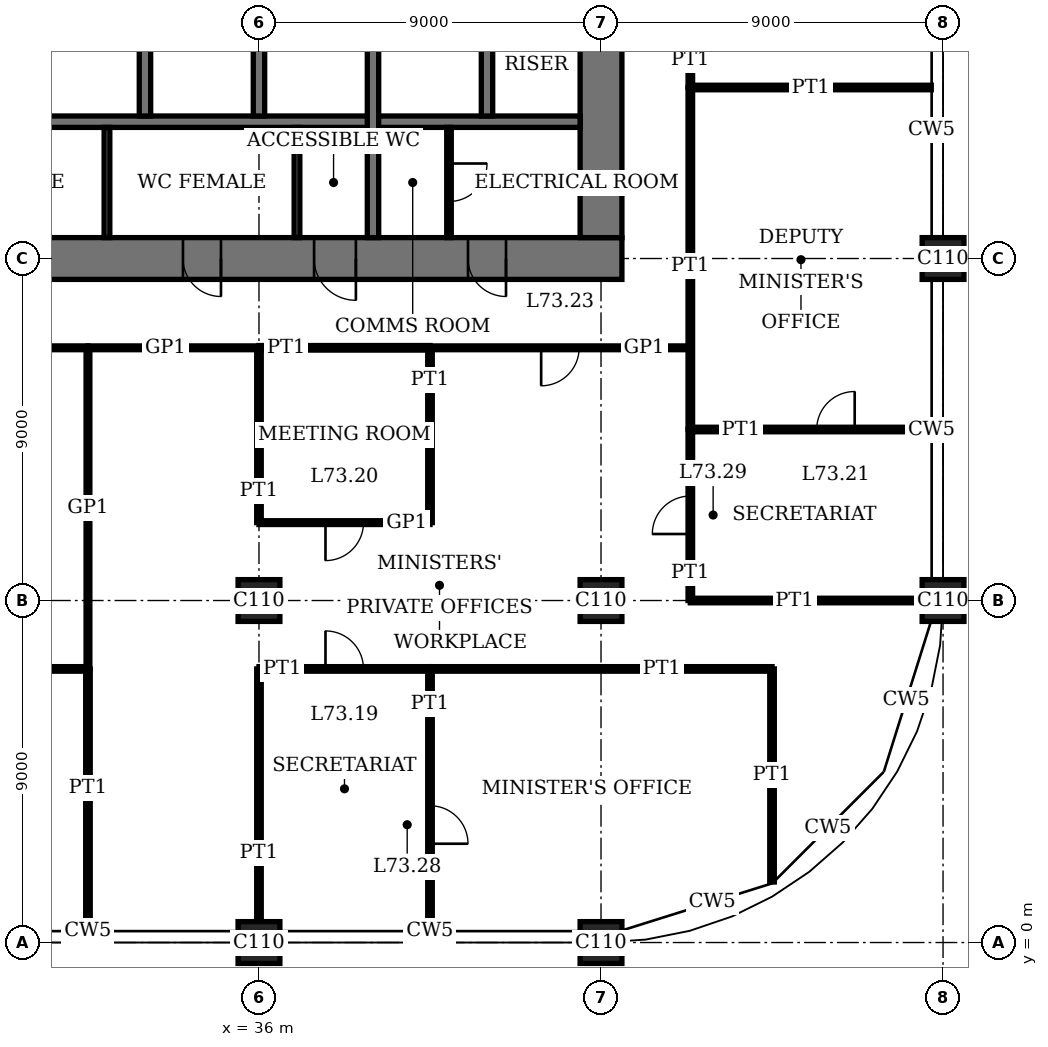
"""IFC4 building model, lengths in metres.
Left out: names, types, materials, properties, quantities, classifications, styles, units other than length and angle.
Written with IfcOpenShell. Run it as: python <this file> out.ifc"""

import sys

from ifc_helpers import new_model, si_unit, direction, frame, frame_2d, origin, origin_2d, place, context, subcontext, project, spatial, rectangle, extrude, element, fill, save


model = new_model("IFC4")
c1 = context("Model", 3, precision=1e-05, world=origin(), true_north=direction((0.0, 1.0)))
c2 = subcontext(c1, "Body", "Model", "MODEL_VIEW")
j1 = project(units=[si_unit("LENGTHUNIT", "METRE"), si_unit("PLANEANGLEUNIT", "RADIAN")], contexts=[c1])
p1 = place(None, origin())
s1 = spatial("IfcSite", under=j1, at=p1, CompositionType="ELEMENT")
p2 = place(p1, origin())
s2 = spatial("IfcBuilding", under=s1, at=p2, CompositionType="ELEMENT")
p3 = place(p2, frame((0.0, 0.0, 299.4)))
s3 = spatial("IfcBuildingStorey", under=s2, at=p3, CompositionType="ELEMENT", Elevation=299.4)
for number, where, z_axis, x_axis in (
    (1, (36.0, 0.0, 0.0), (0.0, 0.0, 1.0), (1.0, 0.0, 0.0)),
    (2, (36.0, 9.0, 0.0), (0.0, 0.0, 1.0), (1.0, 0.0, 0.0)),
    (3, (45.0, 0.0, 0.0), (0.0, 0.0, 1.0), (1.0, 0.0, 0.0)),
    (4, (45.0, 9.0, 0.0), (0.0, 0.0, 1.0), (1.0, 0.0, 0.0)),
    (5, (54.0, 9.0, 0.0), (0.0, 0.0, 1.0), (1.0, 0.0, 0.0)),
    (6, (54.0, 18.0, 0.0), (0.0, 0.0, 1.0), (1.0, 0.0, 0.0)),
):
    element("IfcColumn", number, at=place(p3, frame(where, z_axis=z_axis, x_axis=x_axis)), inside=s3, PredefinedType="COLUMN", context=c2, shape_type="SweptSolid", body=[
        extrude(rectangle(XDim=1.1, YDim=1.1, at=origin_2d()), origin(), (0.0, 0.0, 1.0), 4.0),
    ])
p4 = place(p3, frame((17.45, 18.0, 0.0), z_axis=(0.0, 0.0, 1.0), x_axis=(1.0, 0.0, 0.0)))
e7 = element("IfcWall", 7, at=p4, inside=s3, PredefinedType="SHEAR", context=c2, shape_type="SweptSolid", body=[
    extrude(rectangle(XDim=28.1, YDim=1.1, at=frame_2d((14.05, 0.0))), origin(), (0.0, 0.0, 1.0), 4.0),
])
p5 = place(p4, frame((11.55, 0.0, 0.0)))
e8 = element("IfcOpeningElement", 8, at=p5, cuts=e7, PredefinedType="OPENING", context=c2, shape_type="SweptSolid", body=[
    extrude(rectangle(XDim=1.0, YDim=2.4, at=frame_2d((0.5, 1.2))), frame((0.0, 0.56, 0.0), z_axis=(0.0, -1.0, 0.0), x_axis=(1.0, 0.0, 0.0)), (0.0, 0.0, 1.0), 1.12),
])
p6 = place(p4, frame((16.55, 0.0, 0.0)))
e9 = element("IfcOpeningElement", 9, at=p6, cuts=e7, PredefinedType="OPENING", context=c2, shape_type="SweptSolid", body=[
    extrude(rectangle(XDim=1.0, YDim=2.4, at=frame_2d((0.5, 1.2))), frame((0.0, 0.56, 0.0), z_axis=(0.0, -1.0, 0.0), x_axis=(1.0, 0.0, 0.0)), (0.0, 0.0, 1.0), 1.12),
])
p7 = place(p4, frame((20.0, 0.0, 0.0)))
e10 = element("IfcOpeningElement", 10, at=p7, cuts=e7, PredefinedType="OPENING", context=c2, shape_type="SweptSolid", body=[
    extrude(rectangle(XDim=1.1, YDim=2.4, at=frame_2d((0.55, 1.2))), frame((0.0, 0.56, 0.0), z_axis=(0.0, -1.0, 0.0), x_axis=(1.0, 0.0, 0.0)), (0.0, 0.0, 1.0), 1.12),
])
p8 = place(p4, frame((24.05, 0.0, 0.0)))
e11 = element("IfcOpeningElement", 11, at=p8, cuts=e7, PredefinedType="OPENING", context=c2, shape_type="SweptSolid", body=[
    extrude(rectangle(XDim=1.0, YDim=2.4, at=frame_2d((0.5, 1.2))), frame((0.0, 0.56, 0.0), z_axis=(0.0, -1.0, 0.0), x_axis=(1.0, 0.0, 0.0)), (0.0, 0.0, 1.0), 1.12),
])
p9 = place(p3, frame((45.0, 18.55, 0.0), z_axis=(0.0, 0.0, 1.0), x_axis=(0.0, 1.0, 0.0)))
e12 = element("IfcWall", 12, at=p9, inside=s3, PredefinedType="SHEAR", context=c2, shape_type="SweptSolid", body=[
    extrude(rectangle(XDim=16.9, YDim=1.1, at=frame_2d((8.45, 0.0))), origin(), (0.0, 0.0, 1.0), 4.0),
])
p10 = place(p9, frame((8.45, 0.0, 0.0)))
e13 = element("IfcOpeningElement", 13, at=p10, cuts=e12, PredefinedType="OPENING", context=c2, shape_type="SweptSolid", body=[
    extrude(rectangle(XDim=1.8, YDim=2.4, at=frame_2d((0.9, 1.2))), frame((0.0, 0.56, 0.0), z_axis=(0.0, -1.0, 0.0), x_axis=(1.0, 0.0, 0.0)), (0.0, 0.0, 1.0), 1.12),
])
p11 = place(p3, frame((27.15, 21.6, 0.0), z_axis=(0.0, 0.0, 1.0), x_axis=(1.0, 0.0, 0.0)))
e14 = element("IfcWall", 14, at=p11, inside=s3, PredefinedType="SHEAR", context=c2, shape_type="SweptSolid", body=[
    extrude(rectangle(XDim=17.3, YDim=0.3, at=frame_2d((8.65, 0.0))), origin(), (0.0, 0.0, 1.0), 4.0),
])
for number, where, z_axis, x_axis in (
    (15, (33.0, 21.75, 0.0), (0.0, 0.0, 1.0), (0.0, 1.0, 0.0)),
    (16, (36.0, 21.75, 0.0), (0.0, 0.0, 1.0), (0.0, 1.0, 0.0)),
):
    element("IfcWall", number, at=place(p3, frame(where, z_axis=z_axis, x_axis=x_axis)), inside=s3, PredefinedType="SHEAR", context=c2, shape_type="SweptSolid", body=[
        extrude(rectangle(XDim=2.7, YDim=0.3, at=frame_2d((1.35, 0.0))), origin(), (0.0, 0.0, 1.0), 4.0),
    ])
p12 = place(p3, frame((39.0, 18.55, 0.0), z_axis=(0.0, 0.0, 1.0), x_axis=(0.0, 1.0, 0.0)))
e17 = element("IfcWall", 17, at=p12, inside=s3, PredefinedType="SHEAR", context=c2, shape_type="SweptSolid", body=[
    extrude(rectangle(XDim=5.9, YDim=0.3, at=frame_2d((2.95, 0.0))), origin(), (0.0, 0.0, 1.0), 4.0),
])
p13 = place(p3, frame((42.0, 21.75, 0.0), z_axis=(0.0, 0.0, 1.0), x_axis=(0.0, 1.0, 0.0)))
e18 = element("IfcWall", 18, at=p13, inside=s3, PredefinedType="SHEAR", context=c2, shape_type="SweptSolid", body=[
    extrude(rectangle(XDim=2.7, YDim=0.3, at=frame_2d((1.35, 0.0))), origin(), (0.0, 0.0, 1.0), 4.0),
])
p14 = place(p3, frame((22.5, 7.2, 0.0), z_axis=(0.0, 0.0, 1.0), x_axis=(1.0, 0.0, 0.0)))
e19 = element("IfcWall", 19, at=p14, inside=s3, PredefinedType="PARTITIONING", context=c2, shape_type="SweptSolid", body=[
    extrude(rectangle(XDim=9.0, YDim=0.12, at=frame_2d((4.5, 0.0))), origin(), (0.0, 0.0, 1.0), 3.75),
])
p15 = place(p3, frame((36.0, 7.2, 0.0), z_axis=(0.0, 0.0, 1.0), x_axis=(1.0, 0.0, 0.0)))
e20 = element("IfcWall", 20, at=p15, inside=s3, PredefinedType="PARTITIONING", context=c2, shape_type="SweptSolid", body=[
    extrude(rectangle(XDim=4.5, YDim=0.12, at=frame_2d((2.25, 0.0))), origin(), (0.0, 0.0, 1.0), 3.75),
])
p16 = place(p15, frame((1.75, 0.0, 0.0)))
e21 = element("IfcOpeningElement", 21, at=p16, cuts=e20, PredefinedType="OPENING", context=c2, shape_type="SweptSolid", body=[
    extrude(rectangle(XDim=1.0, YDim=2.4, at=frame_2d((0.5, 1.2))), frame((0.0, 0.07, 0.0), z_axis=(0.0, -1.0, 0.0), x_axis=(1.0, 0.0, 0.0)), (0.0, 0.0, 1.0), 0.14),
])
p17 = place(p3, frame((40.5, 7.2, 0.0), z_axis=(0.0, 0.0, 1.0), x_axis=(1.0, 0.0, 0.0)))
e22 = element("IfcWall", 22, at=p17, inside=s3, PredefinedType="PARTITIONING", context=c2, shape_type="SweptSolid", body=[
    extrude(rectangle(XDim=9.0, YDim=0.12, at=frame_2d((4.5, 0.0))), origin(), (0.0, 0.0, 1.0), 3.75),
])
p18 = place(p3, frame((47.35, 9.0, 0.0), z_axis=(0.0, 0.0, 1.0), x_axis=(1.0, 0.0, 0.0)))
e23 = element("IfcWall", 23, at=p18, inside=s3, PredefinedType="PARTITIONING", context=c2, shape_type="SweptSolid", body=[
    extrude(rectangle(XDim=6.1, YDim=0.12, at=frame_2d((3.05, 0.0))), origin(), (0.0, 0.0, 1.0), 3.05),
])
p19 = place(p3, frame((36.0, 11.05, 0.0), z_axis=(0.0, 0.0, 1.0), x_axis=(1.0, 0.0, 0.0)))
e24 = element("IfcWall", 24, at=p19, inside=s3, PredefinedType="PARTITIONING", context=c2, shape_type="SweptSolid", body=[
    extrude(rectangle(XDim=4.5, YDim=0.1, at=frame_2d((2.25, 0.0))), origin(), (0.0, 0.0, 1.0), 3.75),
])
p20 = place(p19, frame((1.75, 0.0, 0.0)))
e25 = element("IfcOpeningElement", 25, at=p20, cuts=e24, PredefinedType="OPENING", context=c2, shape_type="SweptSolid", body=[
    extrude(rectangle(XDim=1.0, YDim=2.4, at=frame_2d((0.5, 1.2))), frame((0.0, 0.06, 0.0), z_axis=(0.0, -1.0, 0.0), x_axis=(1.0, 0.0, 0.0)), (0.0, 0.0, 1.0), 0.12),
])
p21 = place(p3, frame((47.35, 13.5, 0.0), z_axis=(0.0, 0.0, 1.0), x_axis=(1.0, 0.0, 0.0)))
e26 = element("IfcWall", 26, at=p21, inside=s3, PredefinedType="PARTITIONING", context=c2, shape_type="SweptSolid", body=[
    extrude(rectangle(XDim=6.34, YDim=0.12, at=frame_2d((3.17, 0.0))), origin(), (0.0, 0.0, 1.0), 3.1),
])
p22 = place(p21, frame((3.325, 0.0, 0.0)))
e27 = element("IfcOpeningElement", 27, at=p22, cuts=e26, PredefinedType="OPENING", context=c2, shape_type="SweptSolid", body=[
    extrude(rectangle(XDim=1.0, YDim=2.4, at=frame_2d((0.5, 1.2))), frame((0.0, 0.07, 0.0), z_axis=(0.0, -1.0, 0.0), x_axis=(1.0, 0.0, 0.0)), (0.0, 0.0, 1.0), 0.14),
])
p23 = place(p3, frame((36.0, 15.65, 0.0), z_axis=(0.0, 0.0, 1.0), x_axis=(1.0, 0.0, 0.0)))
e28 = element("IfcWall", 28, at=p23, inside=s3, PredefinedType="PARTITIONING", context=c2, shape_type="SweptSolid", body=[
    extrude(rectangle(XDim=4.5, YDim=0.12, at=frame_2d((2.25, 0.0))), origin(), (0.0, 0.0, 1.0), 3.75),
])
p24 = place(p3, frame((15.6, 15.65, 0.0), z_axis=(0.0, 0.0, 1.0), x_axis=(1.0, 0.0, 0.0)))
e29 = element("IfcWall", 29, at=p24, inside=s3, PredefinedType="PARTITIONING", context=c2, shape_type="SweptSolid", body=[
    extrude(rectangle(XDim=15.9, YDim=0.1, at=frame_2d((7.95, 0.0))), origin(), (0.0, 0.0, 1.0), 3.75),
])
p25 = place(p24, frame((7.45, 0.0, 0.0)))
e30 = element("IfcOpeningElement", 30, at=p25, cuts=e29, PredefinedType="OPENING", context=c2, shape_type="SweptSolid", body=[
    extrude(rectangle(XDim=1.0, YDim=2.4, at=frame_2d((0.5, 1.2))), frame((0.0, 0.06, 0.0), z_axis=(0.0, -1.0, 0.0), x_axis=(1.0, 0.0, 0.0)), (0.0, 0.0, 1.0), 0.12),
])
p26 = place(p3, frame((40.51, 15.65, 0.0), z_axis=(0.0, 0.0, 1.0), x_axis=(1.0, 0.0, 0.0)))
e31 = element("IfcWall", 31, at=p26, inside=s3, PredefinedType="PARTITIONING", context=c2, shape_type="SweptSolid", body=[
    extrude(rectangle(XDim=6.83, YDim=0.1, at=frame_2d((3.415, 0.0))), origin(), (0.0, 0.0, 1.0), 3.75),
])
p27 = place(p26, frame((2.915, 0.0, 0.0)))
e32 = element("IfcOpeningElement", 32, at=p27, cuts=e31, PredefinedType="OPENING", context=c2, shape_type="SweptSolid", body=[
    extrude(rectangle(XDim=1.0, YDim=2.4, at=frame_2d((0.5, 1.2))), frame((0.0, 0.06, 0.0), z_axis=(0.0, -1.0, 0.0), x_axis=(1.0, 0.0, 0.0)), (0.0, 0.0, 1.0), 0.12),
])
p28 = place(p3, frame((31.5, 15.65, 0.0), z_axis=(0.0, 0.0, 1.0), x_axis=(1.0, 0.0, 0.0)))
e33 = element("IfcWall", 33, at=p28, inside=s3, PredefinedType="PARTITIONING", context=c2, shape_type="SweptSolid", body=[
    extrude(rectangle(XDim=4.49, YDim=0.1, at=frame_2d((2.245, 0.0))), origin(), (0.0, 0.0, 1.0), 3.75),
])
p29 = place(p3, frame((47.35, 22.5, 0.0), z_axis=(0.0, 0.0, 1.0), x_axis=(1.0, 0.0, 0.0)))
e34 = element("IfcWall", 34, at=p29, inside=s3, PredefinedType="PARTITIONING", context=c2, shape_type="SweptSolid", body=[
    extrude(rectangle(XDim=6.34, YDim=0.12, at=frame_2d((3.17, 0.0))), origin(), (0.0, 0.0, 1.0), 3.1),
])
p30 = place(p3, frame((31.5, 0.31, 0.0), z_axis=(0.0, 0.0, 1.0), x_axis=(0.0, 1.0, 0.0)))
e35 = element("IfcWall", 35, at=p30, inside=s3, PredefinedType="PARTITIONING", context=c2, shape_type="SweptSolid", body=[
    extrude(rectangle(XDim=6.89, YDim=0.12, at=frame_2d((3.445, 0.0))), origin(), (0.0, 0.0, 1.0), 3.75),
])
p31 = place(p3, frame((31.5, 7.2, 0.0), z_axis=(0.0, 0.0, 1.0), x_axis=(0.0, 1.0, 0.0)))
e36 = element("IfcWall", 36, at=p31, inside=s3, PredefinedType="PARTITIONING", context=c2, shape_type="SweptSolid", body=[
    extrude(rectangle(XDim=8.45, YDim=0.1, at=frame_2d((4.225, 0.0))), origin(), (0.0, 0.0, 1.0), 3.75),
])
p32 = place(p3, frame((36.0, 0.55, 0.0), z_axis=(0.0, 0.0, 1.0), x_axis=(0.0, 1.0, 0.0)))
e37 = element("IfcWall", 37, at=p32, inside=s3, PredefinedType="PARTITIONING", context=c2, shape_type="SweptSolid", body=[
    extrude(rectangle(XDim=6.65, YDim=0.12, at=frame_2d((3.325, 0.0))), origin(), (0.0, 0.0, 1.0), 3.05),
])
p33 = place(p3, frame((36.0, 11.05, 0.0), z_axis=(0.0, 0.0, 1.0), x_axis=(0.0, 1.0, 0.0)))
e38 = element("IfcWall", 38, at=p33, inside=s3, PredefinedType="PARTITIONING", context=c2, shape_type="SweptSolid", body=[
    extrude(rectangle(XDim=4.6, YDim=0.12, at=frame_2d((2.3, 0.0))), origin(), (0.0, 0.0, 1.0), 3.05),
])
p34 = place(p3, frame((40.5, 0.31, 0.0), z_axis=(0.0, 0.0, 1.0), x_axis=(0.0, 1.0, 0.0)))
e39 = element("IfcWall", 39, at=p34, inside=s3, PredefinedType="PARTITIONING", context=c2, shape_type="SweptSolid", body=[
    extrude(rectangle(XDim=6.89, YDim=0.12, at=frame_2d((3.445, 0.0))), origin(), (0.0, 0.0, 1.0), 3.75),
])
p35 = place(p34, frame((2.29, 0.0, 0.0)))
e40 = element("IfcOpeningElement", 40, at=p35, cuts=e39, PredefinedType="OPENING", context=c2, shape_type="SweptSolid", body=[
    extrude(rectangle(XDim=1.0, YDim=2.4, at=frame_2d((0.5, 1.2))), frame((0.0, 0.07, 0.0), z_axis=(0.0, -1.0, 0.0), x_axis=(1.0, 0.0, 0.0)), (0.0, 0.0, 1.0), 0.14),
])
p36 = place(p3, frame((40.5, 11.05, 0.0), z_axis=(0.0, 0.0, 1.0), x_axis=(0.0, 1.0, 0.0)))
e41 = element("IfcWall", 41, at=p36, inside=s3, PredefinedType="PARTITIONING", context=c2, shape_type="SweptSolid", body=[
    extrude(rectangle(XDim=4.6, YDim=0.12, at=frame_2d((2.3, 0.0))), origin(), (0.0, 0.0, 1.0), 3.75),
])
p37 = place(p3, frame((47.35, 9.0, 0.0), z_axis=(0.0, 0.0, 1.0), x_axis=(0.0, 1.0, 0.0)))
e42 = element("IfcWall", 42, at=p37, inside=s3, PredefinedType="PARTITIONING", context=c2, shape_type="SweptSolid", body=[
    extrude(rectangle(XDim=4.5, YDim=0.12, at=frame_2d((2.25, 0.0))), origin(), (0.0, 0.0, 1.0), 3.75),
])
p38 = place(p37, frame((1.75, 0.0, 0.0)))
e43 = element("IfcOpeningElement", 43, at=p38, cuts=e42, PredefinedType="OPENING", context=c2, shape_type="SweptSolid", body=[
    extrude(rectangle(XDim=1.0, YDim=2.4, at=frame_2d((0.5, 1.2))), frame((0.0, 0.07, 0.0), z_axis=(0.0, -1.0, 0.0), x_axis=(1.0, 0.0, 0.0)), (0.0, 0.0, 1.0), 0.14),
])
p39 = place(p3, frame((47.35, 13.5, 0.0), z_axis=(0.0, 0.0, 1.0), x_axis=(0.0, 1.0, 0.0)))
e44 = element("IfcWall", 44, at=p39, inside=s3, PredefinedType="PARTITIONING", context=c2, shape_type="SweptSolid", body=[
    extrude(rectangle(XDim=9.0, YDim=0.12, at=frame_2d((4.5, 0.0))), origin(), (0.0, 0.0, 1.0), 3.75),
])
p40 = place(p3, frame((47.35, 22.5, 0.0), z_axis=(0.0, 0.0, 1.0), x_axis=(0.0, 1.0, 0.0)))
e45 = element("IfcWall", 45, at=p40, inside=s3, PredefinedType="PARTITIONING", context=c2, shape_type="SweptSolid", body=[
    extrude(rectangle(XDim=4.5, YDim=0.12, at=frame_2d((2.25, 0.0))), origin(), (0.0, 0.0, 1.0), 3.75),
])
p41 = place(p40, frame((1.75, 0.0, 0.0)))
e46 = element("IfcOpeningElement", 46, at=p41, cuts=e45, PredefinedType="OPENING", context=c2, shape_type="SweptSolid", body=[
    extrude(rectangle(XDim=1.0, YDim=2.4, at=frame_2d((0.5, 1.2))), frame((0.0, 0.07, 0.0), z_axis=(0.0, -1.0, 0.0), x_axis=(1.0, 0.0, 0.0)), (0.0, 0.0, 1.0), 0.14),
])
p42 = place(p3, frame((49.5, 1.592, 0.0), z_axis=(0.0, 0.0, 1.0), x_axis=(0.0, 1.0, 0.0)))
e47 = element("IfcWall", 47, at=p42, inside=s3, PredefinedType="PARTITIONING", context=c2, shape_type="SweptSolid", body=[
    extrude(rectangle(XDim=5.608, YDim=0.12, at=frame_2d((2.804, 0.0))), origin(), (0.0, 0.0, 1.0), 3.75),
])
for number, where, z_axis, x_axis in (
    (48, (32.0, 18.55, 0.0), (0.0, 0.0, 1.0), (0.0, 1.0, 0.0)),
    (49, (37.0, 18.55, 0.0), (0.0, 0.0, 1.0), (0.0, 1.0, 0.0)),
):
    element("IfcWall", number, at=place(p3, frame(where, z_axis=z_axis, x_axis=x_axis)), inside=s3, PredefinedType="PARTITIONING", context=c2, shape_type="SweptSolid", body=[
        extrude(rectangle(XDim=2.9, YDim=0.15, at=frame_2d((1.45, 0.0))), origin(), (0.0, 0.0, 1.0), 3.75),
    ])
p43 = place(p3, frame((41.0, 18.55, 0.0), z_axis=(0.0, 0.0, 1.0), x_axis=(0.0, 1.0, 0.0)))
e50 = element("IfcWall", 50, at=p43, inside=s3, PredefinedType="PARTITIONING", context=c2, shape_type="SweptSolid", body=[
    extrude(rectangle(XDim=2.9, YDim=0.12, at=frame_2d((1.45, 0.0))), origin(), (0.0, 0.0, 1.0), 3.75),
])
p44 = place(p43, frame((0.95, 0.0, 0.0)))
e51 = element("IfcOpeningElement", 51, at=p44, cuts=e50, PredefinedType="OPENING", context=c2, shape_type="SweptSolid", body=[
    extrude(rectangle(XDim=1.0, YDim=2.4, at=frame_2d((0.5, 1.2))), frame((0.0, 0.07, 0.0), z_axis=(0.0, -1.0, 0.0), x_axis=(1.0, 0.0, 0.0)), (0.0, 0.0, 1.0), 0.14),
])
p45 = place(p6, origin())
e52 = element("IfcDoor", 52, at=p45, inside=s3, OperationType="SINGLE_SWING_RIGHT", PredefinedType="DOOR", context=c2, shape_type="SweptSolid", body=[
    extrude(rectangle(XDim=1.0, YDim=2.4, at=frame_2d((0.5, 1.2))), frame((0.0, 0.025, 0.0), z_axis=(0.0, -1.0, 0.0), x_axis=(1.0, 0.0, 0.0)), (0.0, 0.0, 1.0), 0.05),
    extrude(rectangle(XDim=0.04, YDim=2.4, at=frame_2d((0.02, 1.2))), frame((0.0, 0.4, 0.0), z_axis=(0.0, -1.0, 0.0), x_axis=(1.0, 0.0, 0.0)), (0.0, 0.0, 1.0), 0.8),
    extrude(rectangle(XDim=0.04, YDim=2.4, at=frame_2d((0.98, 1.2))), frame((0.0, 0.4, 0.0), z_axis=(0.0, -1.0, 0.0), x_axis=(1.0, 0.0, 0.0)), (0.0, 0.0, 1.0), 0.8),
    extrude(rectangle(XDim=1.0, YDim=0.04, at=frame_2d((0.5, 2.38))), frame((0.0, 0.4, 0.0), z_axis=(0.0, -1.0, 0.0), x_axis=(1.0, 0.0, 0.0)), (0.0, 0.0, 1.0), 0.8),
])
fill(e9, e52)
p46 = place(p7, origin())
e53 = element("IfcDoor", 53, at=p46, inside=s3, OperationType="SINGLE_SWING_RIGHT", PredefinedType="DOOR", context=c2, shape_type="SweptSolid", body=[
    extrude(rectangle(XDim=1.1, YDim=2.4, at=frame_2d((0.55, 1.2))), frame((0.0, 0.025, 0.0), z_axis=(0.0, -1.0, 0.0), x_axis=(1.0, 0.0, 0.0)), (0.0, 0.0, 1.0), 0.05),
    extrude(rectangle(XDim=0.04, YDim=2.4, at=frame_2d((0.02, 1.2))), frame((0.0, 0.44, 0.0), z_axis=(0.0, -1.0, 0.0), x_axis=(1.0, 0.0, 0.0)), (0.0, 0.0, 1.0), 0.88),
    extrude(rectangle(XDim=0.04, YDim=2.4, at=frame_2d((1.08, 1.2))), frame((0.0, 0.44, 0.0), z_axis=(0.0, -1.0, 0.0), x_axis=(1.0, 0.0, 0.0)), (0.0, 0.0, 1.0), 0.88),
    extrude(rectangle(XDim=1.1, YDim=0.04, at=frame_2d((0.55, 2.38))), frame((0.0, 0.44, 0.0), z_axis=(0.0, -1.0, 0.0), x_axis=(1.0, 0.0, 0.0)), (0.0, 0.0, 1.0), 0.88),
])
fill(e10, e53)
p47 = place(p8, origin())
e54 = element("IfcDoor", 54, at=p47, inside=s3, OperationType="SINGLE_SWING_RIGHT", PredefinedType="DOOR", context=c2, shape_type="SweptSolid", body=[
    extrude(rectangle(XDim=1.0, YDim=2.4, at=frame_2d((0.5, 1.2))), frame((0.0, 0.025, 0.0), z_axis=(0.0, -1.0, 0.0), x_axis=(1.0, 0.0, 0.0)), (0.0, 0.0, 1.0), 0.05),
    extrude(rectangle(XDim=0.04, YDim=2.4, at=frame_2d((0.02, 1.2))), frame((0.0, 0.4, 0.0), z_axis=(0.0, -1.0, 0.0), x_axis=(1.0, 0.0, 0.0)), (0.0, 0.0, 1.0), 0.8),
    extrude(rectangle(XDim=0.04, YDim=2.4, at=frame_2d((0.98, 1.2))), frame((0.0, 0.4, 0.0), z_axis=(0.0, -1.0, 0.0), x_axis=(1.0, 0.0, 0.0)), (0.0, 0.0, 1.0), 0.8),
    extrude(rectangle(XDim=1.0, YDim=0.04, at=frame_2d((0.5, 2.38))), frame((0.0, 0.4, 0.0), z_axis=(0.0, -1.0, 0.0), x_axis=(1.0, 0.0, 0.0)), (0.0, 0.0, 1.0), 0.8),
])
fill(e11, e54)
p48 = place(p16, origin())
e55 = element("IfcDoor", 55, at=p48, inside=s3, OperationType="SINGLE_SWING_RIGHT", PredefinedType="DOOR", context=c2, shape_type="SweptSolid", body=[
    extrude(rectangle(XDim=1.0, YDim=2.4, at=frame_2d((0.5, 1.2))), frame((0.0, 0.025, 0.0), z_axis=(0.0, -1.0, 0.0), x_axis=(1.0, 0.0, 0.0)), (0.0, 0.0, 1.0), 0.05),
])
fill(e21, e55)
p49 = place(p20, origin())
e56 = element("IfcDoor", 56, at=p49, inside=s3, OperationType="SINGLE_SWING_LEFT", PredefinedType="DOOR", context=c2, shape_type="SweptSolid", body=[
    extrude(rectangle(XDim=1.0, YDim=2.4, at=frame_2d((0.5, 1.2))), frame((0.0, 0.02, 0.0), z_axis=(0.0, -1.0, 0.0), x_axis=(1.0, 0.0, 0.0)), (0.0, 0.0, 1.0), 0.04),
])
fill(e25, e56)
p50 = place(p22, origin())
e57 = element("IfcDoor", 57, at=p50, inside=s3, OperationType="SINGLE_SWING_LEFT", PredefinedType="DOOR", context=c2, shape_type="SweptSolid", body=[
    extrude(rectangle(XDim=1.0, YDim=2.4, at=frame_2d((0.5, 1.2))), frame((0.0, 0.025, 0.0), z_axis=(0.0, -1.0, 0.0), x_axis=(1.0, 0.0, 0.0)), (0.0, 0.0, 1.0), 0.05),
])
fill(e27, e57)
p51 = place(p27, origin())
e58 = element("IfcDoor", 58, at=p51, inside=s3, OperationType="SINGLE_SWING_LEFT", PredefinedType="DOOR", context=c2, shape_type="SweptSolid", body=[
    extrude(rectangle(XDim=1.0, YDim=2.4, at=frame_2d((0.5, 1.2))), frame((0.0, 0.02, 0.0), z_axis=(0.0, -1.0, 0.0), x_axis=(1.0, 0.0, 0.0)), (0.0, 0.0, 1.0), 0.04),
])
fill(e32, e58)
p52 = place(p35, origin())
e59 = element("IfcDoor", 59, at=p52, inside=s3, OperationType="SINGLE_SWING_LEFT", PredefinedType="DOOR", context=c2, shape_type="SweptSolid", body=[
    extrude(rectangle(XDim=1.0, YDim=2.4, at=frame_2d((0.5, 1.2))), frame((0.0, 0.025, 0.0), z_axis=(0.0, -1.0, 0.0), x_axis=(1.0, 0.0, 0.0)), (0.0, 0.0, 1.0), 0.05),
])
fill(e40, e59)
p53 = place(p38, origin())
e60 = element("IfcDoor", 60, at=p53, inside=s3, OperationType="SINGLE_SWING_RIGHT", PredefinedType="DOOR", context=c2, shape_type="SweptSolid", body=[
    extrude(rectangle(XDim=1.0, YDim=2.4, at=frame_2d((0.5, 1.2))), frame((0.0, 0.025, 0.0), z_axis=(0.0, -1.0, 0.0), x_axis=(1.0, 0.0, 0.0)), (0.0, 0.0, 1.0), 0.05),
])
fill(e43, e60)
p54 = place(p44, origin())
e61 = element("IfcDoor", 61, at=p54, inside=s3, OperationType="SINGLE_SWING_RIGHT", PredefinedType="DOOR", context=c2, shape_type="SweptSolid", body=[
    extrude(rectangle(XDim=1.0, YDim=2.4, at=frame_2d((0.5, 1.2))), frame((0.0, 0.03, 0.0), z_axis=(0.0, -1.0, 0.0), x_axis=(1.0, 0.0, 0.0)), (0.0, 0.0, 1.0), 0.06),
])
fill(e51, e61)
save(model, sys.argv[1])
